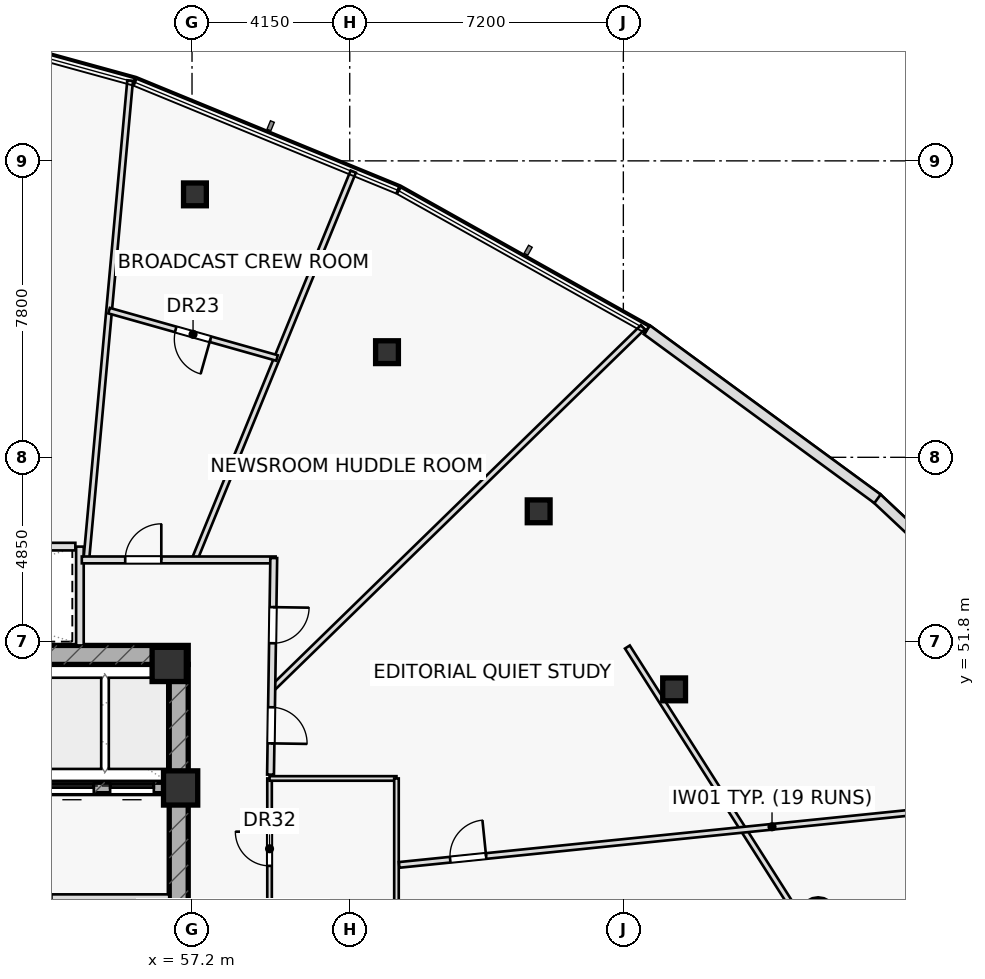
"""IFC4 building model, lengths in metres.
Left out: names, types, materials, properties, quantities, classifications, styles, units other than length and angle.
Written with IfcOpenShell. Run it as: python <this file> out.ifc"""

import sys

from ifc_helpers import new_model, si_unit, direction, frame, frame_2d, origin, origin_2d, place, context, subcontext, project, spatial, rectangle, hollow_rectangle, hollow_circle, extrude, element, fill, save


model = new_model("IFC4")
c1 = context("Model", 3, precision=1e-05, world=origin(), true_north=direction((0.0, 1.0)))
c2 = subcontext(c1, "Body", "Model", "MODEL_VIEW")
j1 = project(units=[si_unit("LENGTHUNIT", "METRE"), si_unit("PLANEANGLEUNIT", "RADIAN")], contexts=[c1])
p1 = place(None, origin())
s1 = spatial("IfcSite", under=j1, at=p1, CompositionType="ELEMENT")
p2 = place(p1, origin())
s2 = spatial("IfcBuilding", under=s1, at=p2, CompositionType="ELEMENT")
p3 = place(p2, frame((0.0, 0.0, 177.2)))
s3 = spatial("IfcBuildingStorey", under=s2, at=p3, CompositionType="ELEMENT", Elevation=177.2)
p4 = place(p3, frame((42.9, 51.45, 0.0), z_axis=(0.0, 0.0, 1.0), x_axis=(1.0, 0.0, 0.0)))
e1 = element("IfcWall", 1, at=p4, inside=s3, PredefinedType="SHEAR", context=c2, shape_type="SweptSolid", body=[
    extrude(rectangle(XDim=14.2, YDim=0.5, at=frame_2d((7.1, 0.0))), origin(), (0.0, 0.0, 1.0), 3.55),
])
p5 = place(p4, frame((0.78, 0.0, 0.0)))
e2 = element("IfcOpeningElement", 2, at=p5, cuts=e1, PredefinedType="OPENING", context=c2, shape_type="SweptSolid", body=[
    extrude(rectangle(XDim=1.05, YDim=2.2, at=frame_2d((0.525, 1.1))), frame((0.0, 0.26, 0.0), z_axis=(0.0, -1.0, 0.0), x_axis=(1.0, 0.0, 0.0)), (0.0, 0.0, 1.0), 0.52),
])
p6 = place(p3, frame((56.85, 38.8, 0.0), z_axis=(0.0, 0.0, 1.0), x_axis=(0.0, 1.0, 0.0)))
e3 = element("IfcWall", 3, at=p6, inside=s3, PredefinedType="SHEAR", context=c2, shape_type="SweptSolid", body=[
    extrude(rectangle(XDim=12.4, YDim=0.5, at=frame_2d((6.2, 0.0))), origin(), (0.0, 0.0, 1.0), 3.55),
])
p7 = place(p6, frame((3.85, 0.0, 0.0)))
e4 = element("IfcOpeningElement", 4, at=p7, cuts=e3, PredefinedType="OPENING", context=c2, shape_type="SweptSolid", body=[
    extrude(rectangle(XDim=1.5, YDim=2.2, at=frame_2d((0.75, 1.1))), frame((0.0, 0.26, 0.0), z_axis=(0.0, -1.0, 0.0), x_axis=(1.0, 0.0, 0.0)), (0.0, 0.0, 1.0), 0.52),
])
p8 = place(p3, frame((43.4, 47.95, 0.0), z_axis=(0.0, 0.0, 1.0), x_axis=(1.0, 0.0, 0.0)))
e5 = element("IfcWall", 5, at=p8, inside=s3, PredefinedType="SHEAR", context=c2, shape_type="SweptSolid", body=[
    extrude(rectangle(XDim=13.2, YDim=0.3, at=frame_2d((6.6, 0.0))), origin(), (0.0, 0.0, 1.0), 3.55),
])
p9 = place(p8, frame((8.345, 0.0, 0.0)))
e6 = element("IfcOpeningElement", 6, at=p9, cuts=e5, PredefinedType="OPENING", context=c2, shape_type="SweptSolid", body=[
    extrude(rectangle(XDim=1.15, YDim=2.2, at=frame_2d((0.575, 1.1))), frame((0.0, 0.16, 0.0), z_axis=(0.0, -1.0, 0.0), x_axis=(1.0, 0.0, 0.0)), (0.0, 0.0, 1.0), 0.32),
])
p10 = place(p8, frame((10.065, 0.0, 0.0)))
e7 = element("IfcOpeningElement", 7, at=p10, cuts=e5, PredefinedType="OPENING", context=c2, shape_type="SweptSolid", body=[
    extrude(rectangle(XDim=1.15, YDim=2.2, at=frame_2d((0.575, 1.1))), frame((0.0, 0.16, 0.0), z_axis=(0.0, -1.0, 0.0), x_axis=(1.0, 0.0, 0.0)), (0.0, 0.0, 1.0), 0.32),
])
p11 = place(p8, frame((11.645, 0.0, 0.0)))
e8 = element("IfcOpeningElement", 8, at=p11, cuts=e5, PredefinedType="OPENING", context=c2, shape_type="SweptSolid", body=[
    extrude(rectangle(XDim=1.15, YDim=2.2, at=frame_2d((0.575, 1.1))), frame((0.0, 0.16, 0.0), z_axis=(0.0, -1.0, 0.0), x_axis=(1.0, 0.0, 0.0)), (0.0, 0.0, 1.0), 0.32),
])
for number, where, z_axis, x_axis in (
    (9, (56.9, 47.95, 0.0), (0.0, 0.0, 1.0), (1.0, 0.0, 0.0)),
    (10, (56.6, 51.2, 0.0), (0.0, 0.0, 1.0), (1.0, 0.0, 0.0)),
):
    element("IfcColumn", number, at=place(p3, frame(where, z_axis=z_axis, x_axis=x_axis)), inside=s3, PredefinedType="COLUMN", context=c2, shape_type="SweptSolid", body=[
        extrude(rectangle(XDim=0.9, YDim=0.9, at=origin_2d()), origin(), (0.0, 0.0, 1.0), 3.55),
    ])
p12 = place(p3, frame((73.676, 44.58, 0.0), z_axis=(0.0, 0.0, 1.0), x_axis=(1.0, 0.0, 0.0)))
e11 = element("IfcColumn", 11, at=p12, inside=s3, PredefinedType="COLUMN", context=c2, shape_type="SweptSolid", body=[
    extrude(hollow_circle(Radius=0.457, WallThickness=0.04, at=origin_2d()), origin(), (0.0, 0.0, 1.0), 3.55),
])
for number, where, z_axis, x_axis in (
    (12, (69.886, 50.544, 0.0), (0.0, 0.0, 1.0), (1.0, 0.0, 0.0)),
    (13, (66.322, 55.229, 0.0), (0.0, 0.0, 1.0), (1.0, 0.0, 0.0)),
    (14, (62.331, 59.416, 0.0), (0.0, 0.0, 1.0), (1.0, 0.0, 0.0)),
    (15, (57.277, 63.568, 0.0), (0.0, 0.0, 1.0), (1.0, 0.0, 0.0)),
):
    element("IfcColumn", number, at=place(p3, frame(where, z_axis=z_axis, x_axis=x_axis)), inside=s3, PredefinedType="COLUMN", context=c2, shape_type="SweptSolid", body=[
        extrude(hollow_rectangle(XDim=0.6, YDim=0.6, WallThickness=0.036, at=origin_2d()), origin(), (0.0, 0.0, 1.0), 3.55),
    ])
p13 = place(p3, frame((54.25, 51.7, 0.0), z_axis=(0.0, 0.0, 1.0), x_axis=(0.0, 1.0, 0.0)))
e16 = element("IfcWall", 16, at=p13, inside=s3, PredefinedType="PARTITIONING", context=c2, shape_type="SweptSolid", body=[
    extrude(rectangle(XDim=2.6, YDim=0.2, at=frame_2d((1.3, 0.0))), origin(), (0.0, 0.0, 1.0), 3.55),
])
p14 = place(p3, frame((50.65, 45.05, 0.0), z_axis=(0.0, 0.0, 1.0), x_axis=(1.0, 0.0, 0.0)))
e17 = element("IfcWall", 17, at=p14, inside=s3, PredefinedType="PARTITIONING", context=c2, shape_type="SweptSolid", body=[
    extrude(rectangle(XDim=5.95, YDim=0.2, at=frame_2d((2.975, 0.0))), origin(), (0.0, 0.0, 1.0), 3.55),
])
p15 = place(p14, frame((1.35, 0.0, 0.0)))
e18 = element("IfcOpeningElement", 18, at=p15, cuts=e17, PredefinedType="OPENING", context=c2, shape_type="SweptSolid", body=[
    extrude(rectangle(XDim=1.5, YDim=2.2, at=frame_2d((0.75, 1.1))), frame((0.0, 0.11, 0.0), z_axis=(0.0, -1.0, 0.0), x_axis=(1.0, 0.0, 0.0)), (0.0, 0.0, 1.0), 0.22),
])
p16 = place(p3, frame((74.163, 42.993, 0.0), z_axis=(0.0, 0.0, 1.0), x_axis=(-0.53628142437, 0.844039237166, 0.0)))
e19 = element("IfcWall", 19, at=p16, inside=s3, PredefinedType="PARTITIONING", context=c2, shape_type="SweptSolid", body=[
    extrude(rectangle(XDim=10.267, YDim=0.15, at=frame_2d((5.133, 0.0))), origin(), (0.0, 0.0, 1.0), 2.935),
])
p17 = place(p3, frame((59.24, 41.2, 0.0), z_axis=(0.0, 0.0, 1.0), x_axis=(0.0, 1.0, 0.0)))
e20 = element("IfcWall", 20, at=p17, inside=s3, PredefinedType="PARTITIONING", context=c2, shape_type="SweptSolid", body=[
    extrude(rectangle(XDim=7.0, YDim=0.12, at=frame_2d((3.5, 0.0))), origin(), (0.0, 0.0, 1.0), 3.55),
])
p18 = place(p17, frame((1.15, 0.0, 0.0)))
e21 = element("IfcOpeningElement", 21, at=p18, cuts=e20, PredefinedType="OPENING", context=c2, shape_type="SweptSolid", body=[
    extrude(rectangle(XDim=0.9, YDim=2.05, at=frame_2d((0.45, 1.025))), frame((0.0, 0.07, 0.0), z_axis=(0.0, -1.0, 0.0), x_axis=(1.0, 0.0, 0.0)), (0.0, 0.0, 1.0), 0.14),
])
p19 = place(p17, frame((4.7, 0.0, 0.0)))
e22 = element("IfcOpeningElement", 22, at=p19, cuts=e20, PredefinedType="OPENING", context=c2, shape_type="SweptSolid", body=[
    extrude(rectangle(XDim=0.9, YDim=2.05, at=frame_2d((0.45, 1.025))), frame((0.0, 0.07, 0.0), z_axis=(0.0, -1.0, 0.0), x_axis=(1.0, 0.0, 0.0)), (0.0, 0.0, 1.0), 0.14),
])
p20 = place(p3, frame((59.24, 48.2, 0.0), z_axis=(0.0, 0.0, 1.0), x_axis=(1.0, 0.0, 0.0)))
e23 = element("IfcWall", 23, at=p20, inside=s3, PredefinedType="PARTITIONING", context=c2, shape_type="SweptSolid", body=[
    extrude(rectangle(XDim=3.34, YDim=0.12, at=frame_2d((1.67, 0.0))), origin(), (0.0, 0.0, 1.0), 3.55),
])
p21 = place(p3, frame((62.58, 41.2, 0.0), z_axis=(0.0, 0.0, 1.0), x_axis=(0.0, 1.0, 0.0)))
e24 = element("IfcWall", 24, at=p21, inside=s3, PredefinedType="PARTITIONING", context=c2, shape_type="SweptSolid", body=[
    extrude(rectangle(XDim=7.0, YDim=0.12, at=frame_2d((3.5, 0.0))), origin(), (0.0, 0.0, 1.0), 3.55),
])
p22 = place(p3, frame((62.65, 45.925, 0.0), z_axis=(0.0, 0.0, 1.0), x_axis=(0.994818188215, 0.10166991884, 0.0)))
e25 = element("IfcWall", 25, at=p22, inside=s3, PredefinedType="PARTITIONING", context=c2, shape_type="SweptSolid", body=[
    extrude(rectangle(XDim=19.727, YDim=0.15, at=frame_2d((9.863, 0.0))), origin(), (0.0, 0.0, 1.0), 3.025),
])
p23 = place(p22, frame((1.35, 0.0, 0.0)))
e26 = element("IfcOpeningElement", 26, at=p23, cuts=e25, PredefinedType="OPENING", context=c2, shape_type="SweptSolid", body=[
    extrude(rectangle(XDim=0.95, YDim=2.05, at=frame_2d((0.475, 1.025))), frame((0.0, 0.085, 0.0), z_axis=(0.0, -1.0, 0.0), x_axis=(1.0, 0.0, 0.0)), (0.0, 0.0, 1.0), 0.17),
])
p24 = place(p3, frame((59.299, 50.556, 0.0), z_axis=(0.0, 0.0, 1.0), x_axis=(0.716064123936, 0.698034505173, 0.0)))
e27 = element("IfcWall", 27, at=p24, inside=s3, PredefinedType="PARTITIONING", context=c2, shape_type="SweptSolid", body=[
    extrude(rectangle(XDim=13.636, YDim=0.15, at=frame_2d((6.818, 0.0))), origin(), (0.0, 0.0, 1.0), 2.935),
])
p25 = place(p3, frame((57.262, 53.95, 0.0), z_axis=(0.0, 0.0, 1.0), x_axis=(0.378714644372, 0.925513488901, 0.0)))
e28 = element("IfcWall", 28, at=p25, inside=s3, PredefinedType="PARTITIONING", context=c2, shape_type="SweptSolid", body=[
    extrude(rectangle(XDim=11.04, YDim=0.15, at=frame_2d((5.52, 0.0))), origin(), (0.0, 0.0, 1.0), 3.025),
])
p26 = place(p3, frame((54.418, 53.95, 0.0), z_axis=(0.0, 0.0, 1.0), x_axis=(0.091038002484, 0.995847419088, 0.0)))
e29 = element("IfcWall", 29, at=p26, inside=s3, PredefinedType="PARTITIONING", context=c2, shape_type="SweptSolid", body=[
    extrude(rectangle(XDim=12.666, YDim=0.15, at=frame_2d((6.333, 0.0))), origin(), (0.0, 0.0, 1.0), 2.935),
])
p27 = place(p3, frame((59.436, 59.263, 0.0), z_axis=(0.0, 0.0, 1.0), x_axis=(-0.962485295009, 0.27133384767, 0.0)))
e30 = element("IfcWall", 30, at=p27, inside=s3, PredefinedType="PARTITIONING", context=c2, shape_type="SweptSolid", body=[
    extrude(rectangle(XDim=4.591, YDim=0.15, at=frame_2d((2.295, 0.0))), origin(), (0.0, 0.0, 1.0), 2.935),
])
p28 = place(p27, frame((1.82, 0.0, 0.0)))
e31 = element("IfcOpeningElement", 31, at=p28, cuts=e30, PredefinedType="OPENING", context=c2, shape_type="SweptSolid", body=[
    extrude(rectangle(XDim=0.95, YDim=2.05, at=frame_2d((0.475, 1.025))), frame((0.0, 0.085, 0.0), z_axis=(0.0, -1.0, 0.0), x_axis=(1.0, 0.0, 0.0)), (0.0, 0.0, 1.0), 0.17),
])
p29 = place(p3, frame((54.3, 53.95, 0.0), z_axis=(0.0, 0.0, 1.0), x_axis=(1.0, 0.0, 0.0)))
e32 = element("IfcWall", 32, at=p29, inside=s3, PredefinedType="PARTITIONING", context=c2, shape_type="SweptSolid", body=[
    extrude(rectangle(XDim=5.1, YDim=0.18, at=frame_2d((2.55, 0.0))), origin(), (0.0, 0.0, 1.0), 2.935),
])
p30 = place(p29, frame((1.142, 0.0, 0.0)))
e33 = element("IfcOpeningElement", 33, at=p30, cuts=e32, PredefinedType="OPENING", context=c2, shape_type="SweptSolid", body=[
    extrude(rectangle(XDim=0.95, YDim=2.05, at=frame_2d((0.475, 1.025))), frame((0.0, 0.1, 0.0), z_axis=(0.0, -1.0, 0.0), x_axis=(1.0, 0.0, 0.0)), (0.0, 0.0, 1.0), 0.2),
])
p31 = place(p3, frame((59.351, 54.0, 0.0), z_axis=(0.0, 0.0, 1.0), x_axis=(-0.014903899768, -0.999888930718, 0.0)))
e34 = element("IfcWall", 34, at=p31, inside=s3, PredefinedType="PARTITIONING", context=c2, shape_type="SweptSolid", body=[
    extrude(rectangle(XDim=5.701, YDim=0.18, at=frame_2d((2.85, 0.0))), origin(), (0.0, 0.0, 1.0), 2.935),
])
p32 = place(p31, frame((1.292, 0.0, 0.0)))
e35 = element("IfcOpeningElement", 35, at=p32, cuts=e34, PredefinedType="OPENING", context=c2, shape_type="SweptSolid", body=[
    extrude(rectangle(XDim=0.95, YDim=2.05, at=frame_2d((0.475, 1.025))), frame((0.0, 0.1, 0.0), z_axis=(0.0, -1.0, 0.0), x_axis=(1.0, 0.0, 0.0)), (0.0, 0.0, 1.0), 0.2),
])
p33 = place(p31, frame((3.927, 0.0, 0.0)))
e36 = element("IfcOpeningElement", 36, at=p33, cuts=e34, PredefinedType="OPENING", context=c2, shape_type="SweptSolid", body=[
    extrude(rectangle(XDim=0.95, YDim=2.05, at=frame_2d((0.475, 1.025))), frame((0.0, 0.1, 0.0), z_axis=(0.0, -1.0, 0.0), x_axis=(1.0, 0.0, 0.0)), (0.0, 0.0, 1.0), 0.2),
])
p34 = place(p3, frame((80.71, 50.421, 0.0), z_axis=(0.0, 0.0, 1.0), x_axis=(-0.729234024458, 0.684264376957, 0.0)))
e37 = element("IfcWall", 37, at=p34, inside=s3, PredefinedType="STANDARD", context=c2, shape_type="SweptSolid", body=[
    extrude(rectangle(XDim=7.535, YDim=0.28, at=frame_2d((3.768, 0.0))), origin(), (0.0, 0.0, 1.0), 3.55),
])
p35 = place(p3, frame((75.238, 55.558, 0.0), z_axis=(0.0, 0.0, 1.0), x_axis=(-0.806682422919, 0.590985167795, 0.0)))
e38 = element("IfcWall", 38, at=p35, inside=s3, PredefinedType="STANDARD", context=c2, shape_type="SweptSolid", body=[
    extrude(rectangle(XDim=7.523, YDim=0.28, at=frame_2d((3.762, 0.0))), origin(), (0.0, 0.0, 1.0), 3.55),
])
p36 = place(p3, frame((45.82, 54.3, 0.0), z_axis=(0.0, 0.0, 1.0), x_axis=(1.0, 0.0, 0.0)))
e39 = element("IfcWall", 39, at=p36, inside=s3, PredefinedType="PARTITIONING", context=c2, shape_type="SweptSolid", body=[
    extrude(rectangle(XDim=8.31, YDim=0.2, at=frame_2d((4.155, 0.0))), origin(), (0.0, 0.0, 1.0), 3.55),
])
p37 = place(p19, origin())
e40 = element("IfcDoor", 40, at=p37, inside=s3, OperationType="SINGLE_SWING_RIGHT", PredefinedType="DOOR", context=c2, shape_type="SweptSolid", body=[
    extrude(rectangle(XDim=0.9, YDim=2.05, at=frame_2d((0.45, 1.025))), frame((0.0, 0.025, 0.0), z_axis=(0.0, -1.0, 0.0), x_axis=(1.0, 0.0, 0.0)), (0.0, 0.0, 1.0), 0.05),
])
fill(e22, e40)
p38 = place(p23, origin())
e41 = element("IfcDoor", 41, at=p38, inside=s3, OperationType="SINGLE_SWING_RIGHT", PredefinedType="DOOR", context=c2, shape_type="SweptSolid", body=[
    extrude(rectangle(XDim=0.95, YDim=2.05, at=frame_2d((0.475, 1.025))), frame((0.0, 0.025, 0.0), z_axis=(0.0, -1.0, 0.0), x_axis=(1.0, 0.0, 0.0)), (0.0, 0.0, 1.0), 0.05),
])
fill(e26, e41)
p39 = place(p28, origin())
e42 = element("IfcDoor", 42, at=p39, inside=s3, OperationType="SINGLE_SWING_LEFT", PredefinedType="DOOR", context=c2, shape_type="SweptSolid", body=[
    extrude(rectangle(XDim=0.95, YDim=2.05, at=frame_2d((0.475, 1.025))), frame((0.0, 0.025, 0.0), z_axis=(0.0, -1.0, 0.0), x_axis=(1.0, 0.0, 0.0)), (0.0, 0.0, 1.0), 0.05),
])
fill(e31, e42)
p40 = place(p30, origin())
e43 = element("IfcDoor", 43, at=p40, inside=s3, OperationType="SINGLE_SWING_RIGHT", PredefinedType="DOOR", context=c2, shape_type="SweptSolid", body=[
    extrude(rectangle(XDim=0.95, YDim=2.05, at=frame_2d((0.475, 1.025))), frame((0.0, 0.025, 0.0), z_axis=(0.0, -1.0, 0.0), x_axis=(1.0, 0.0, 0.0)), (0.0, 0.0, 1.0), 0.05),
])
fill(e33, e43)
p41 = place(p32, origin())
e44 = element("IfcDoor", 44, at=p41, inside=s3, OperationType="SINGLE_SWING_LEFT", PredefinedType="DOOR", context=c2, shape_type="SweptSolid", body=[
    extrude(rectangle(XDim=0.95, YDim=2.05, at=frame_2d((0.475, 1.025))), frame((0.0, 0.025, 0.0), z_axis=(0.0, -1.0, 0.0), x_axis=(1.0, 0.0, 0.0)), (0.0, 0.0, 1.0), 0.05),
])
fill(e35, e44)
p42 = place(p33, origin())
e45 = element("IfcDoor", 45, at=p42, inside=s3, OperationType="SINGLE_SWING_RIGHT", PredefinedType="DOOR", context=c2, shape_type="SweptSolid", body=[
    extrude(rectangle(XDim=0.95, YDim=2.05, at=frame_2d((0.475, 1.025))), frame((0.0, 0.025, 0.0), z_axis=(0.0, -1.0, 0.0), x_axis=(1.0, 0.0, 0.0)), (0.0, 0.0, 1.0), 0.05),
])
fill(e36, e45)
p43 = place(p10, origin())
e46 = element("IfcDoor", 46, at=p43, inside=s3, OperationType="SLIDING_TO_LEFT", PredefinedType="DOOR", context=c2, shape_type="SweptSolid", body=[
    extrude(rectangle(XDim=1.15, YDim=2.2, at=frame_2d((0.575, 1.1))), frame((0.0, 0.025, 0.0), z_axis=(0.0, -1.0, 0.0), x_axis=(1.0, 0.0, 0.0)), (0.0, 0.0, 1.0), 0.05),
])
fill(e7, e46)
p44 = place(p11, origin())
e47 = element("IfcDoor", 47, at=p44, inside=s3, OperationType="SLIDING_TO_LEFT", PredefinedType="DOOR", context=c2, shape_type="SweptSolid", body=[
    extrude(rectangle(XDim=1.15, YDim=2.2, at=frame_2d((0.575, 1.1))), frame((0.0, 0.025, 0.0), z_axis=(0.0, -1.0, 0.0), x_axis=(1.0, 0.0, 0.0)), (0.0, 0.0, 1.0), 0.05),
])
fill(e8, e47)
save(model, sys.argv[1])
